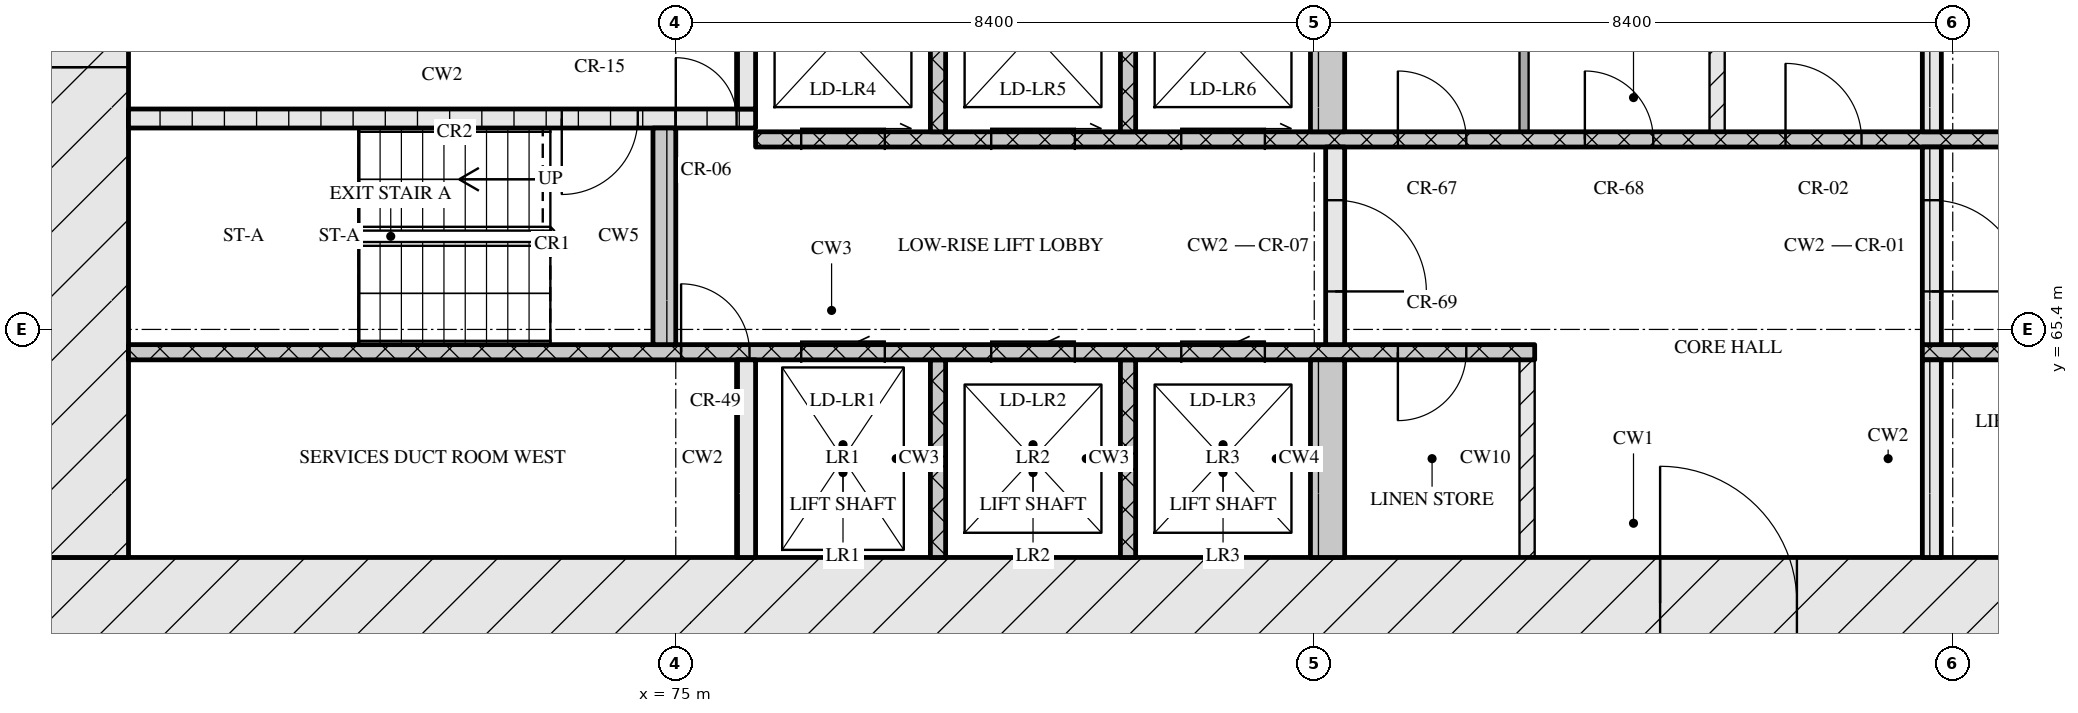
"""IFC4 building model, lengths in metres.
Left out: names, types, materials, properties, quantities, classifications, styles, units other than length and angle.
Written with IfcOpenShell. Run it as: python <this file> out.ifc"""

import sys

from ifc_helpers import new_model, si_unit, direction, frame, frame_2d, origin, place, context, subcontext, project, spatial, rectangle, extrude, element, fill, save


model = new_model("IFC4")
c1 = context("Model", 3, precision=1e-05, world=origin(), true_north=direction((0.0, 1.0)))
c2 = subcontext(c1, "Body", "Model", "MODEL_VIEW")
j1 = project(units=[si_unit("LENGTHUNIT", "METRE"), si_unit("PLANEANGLEUNIT", "RADIAN")], contexts=[c1])
p1 = place(None, origin())
s1 = spatial("IfcSite", under=j1, at=p1, CompositionType="ELEMENT")
p2 = place(p1, origin())
s2 = spatial("IfcBuilding", under=s1, at=p2, CompositionType="ELEMENT")
p3 = place(p2, frame((0.0, 0.0, 69.6)))
s3 = spatial("IfcBuildingStorey", under=s2, at=p3, CompositionType="ELEMENT", Elevation=69.6)
p4 = place(p3, frame((66.6, 61.8, 0.0), z_axis=(0.0, 0.0, 1.0), x_axis=(1.0, 0.0, 0.0)))
e1 = element("IfcWall", 1, at=p4, inside=s3, PredefinedType="SOLIDWALL", context=c2, shape_type="SweptSolid", body=[
    extrude(rectangle(XDim=42.0, YDim=1.2, at=frame_2d((21.0, 0.0))), origin(), (0.0, 0.0, 1.0), 3.32),
])
p5 = place(p4, frame((21.35, 0.0, 0.0)))
e2 = element("IfcOpeningElement", 2, at=p5, cuts=e1, PredefinedType="OPENING", context=c2, shape_type="SweptSolid", body=[
    extrude(rectangle(XDim=1.8, YDim=2.1, at=frame_2d((0.9, 1.05))), frame((0.0, 0.61, 0.0), z_axis=(0.0, -1.0, 0.0), x_axis=(1.0, 0.0, 0.0)), (0.0, 0.0, 1.0), 1.22),
])
p6 = place(p3, frame((67.2, 62.4, 0.0), z_axis=(0.0, 0.0, 1.0), x_axis=(0.0, 1.0, 0.0)))
e3 = element("IfcWall", 3, at=p6, inside=s3, PredefinedType="SOLIDWALL", context=c2, shape_type="SweptSolid", body=[
    extrude(rectangle(XDim=12.0, YDim=1.2, at=frame_2d((6.0, 0.0))), origin(), (0.0, 0.0, 1.0), 3.32),
])
p7 = place(p6, frame((6.45, 0.0, 0.0)))
e4 = element("IfcOpeningElement", 4, at=p7, cuts=e3, PredefinedType="OPENING", context=c2, shape_type="SweptSolid", body=[
    extrude(rectangle(XDim=1.2, YDim=2.1, at=frame_2d((0.6, 1.05))), frame((0.0, 0.61, 0.0), z_axis=(0.0, -1.0, 0.0), x_axis=(1.0, 0.0, 0.0)), (0.0, 0.0, 1.0), 1.22),
])
p8 = place(p3, frame((75.925, 62.4, 0.0), z_axis=(0.0, 0.0, 1.0), x_axis=(0.0, 1.0, 0.0)))
e5 = element("IfcWall", 5, at=p8, inside=s3, PredefinedType="SOLIDWALL", context=c2, shape_type="SweptSolid", body=[
    extrude(rectangle(XDim=2.6, YDim=0.25, at=frame_2d((1.3, 0.0))), origin(), (0.0, 0.0, 1.0), 3.32),
])
for number, where, z_axis, x_axis in (
    (6, (78.45, 62.4, 0.0), (0.0, 0.0, 1.0), (0.0, 1.0, 0.0)),
    (7, (80.95, 62.4, 0.0), (0.0, 0.0, 1.0), (0.0, 1.0, 0.0)),
):
    element("IfcWall", number, at=place(p3, frame(where, z_axis=z_axis, x_axis=x_axis)), inside=s3, PredefinedType="SOLIDWALL", context=c2, shape_type="SweptSolid", body=[
        extrude(rectangle(XDim=2.6, YDim=0.2, at=frame_2d((1.3, 0.0))), origin(), (0.0, 0.0, 1.0), 3.32),
    ])
p9 = place(p3, frame((83.575, 62.4, 0.0), z_axis=(0.0, 0.0, 1.0), x_axis=(0.0, 1.0, 0.0)))
e8 = element("IfcWall", 8, at=p9, inside=s3, PredefinedType="SOLIDWALL", context=c2, shape_type="SweptSolid", body=[
    extrude(rectangle(XDim=2.6, YDim=0.45, at=frame_2d((1.3, 0.0))), origin(), (0.0, 0.0, 1.0), 3.32),
])
p10 = place(p3, frame((86.2, 62.4, 0.0), z_axis=(0.0, 0.0, 1.0), x_axis=(0.0, 1.0, 0.0)))
e9 = element("IfcWall", 9, at=p10, inside=s3, PredefinedType="PARTITIONING", context=c2, shape_type="SweptSolid", body=[
    extrude(rectangle(XDim=2.6, YDim=0.2, at=frame_2d((1.3, 0.0))), origin(), (0.0, 0.0, 1.0), 3.32),
])
p11 = place(p3, frame((91.525, 62.4, 0.0), z_axis=(0.0, 0.0, 1.0), x_axis=(0.0, 1.0, 0.0)))
e10 = element("IfcWall", 10, at=p11, inside=s3, PredefinedType="SOLIDWALL", context=c2, shape_type="SweptSolid", body=[
    extrude(rectangle(XDim=2.6, YDim=0.25, at=frame_2d((1.3, 0.0))), origin(), (0.0, 0.0, 1.0), 3.32),
])
p12 = place(p3, frame((67.8, 65.1, 0.0), z_axis=(0.0, 0.0, 1.0), x_axis=(1.0, 0.0, 0.0)))
e11 = element("IfcWall", 11, at=p12, inside=s3, PredefinedType="SOLIDWALL", context=c2, shape_type="SweptSolid", body=[
    extrude(rectangle(XDim=18.5, YDim=0.2, at=frame_2d((9.25, 0.0))), origin(), (0.0, 0.0, 1.0), 3.32),
])
p13 = place(p12, frame((7.27, 0.0, 0.0)))
e12 = element("IfcOpeningElement", 12, at=p13, cuts=e11, PredefinedType="OPENING", context=c2, shape_type="SweptSolid", body=[
    extrude(rectangle(XDim=0.9, YDim=2.1, at=frame_2d((0.45, 1.05))), frame((0.0, 0.11, 0.0), z_axis=(0.0, -1.0, 0.0), x_axis=(1.0, 0.0, 0.0)), (0.0, 0.0, 1.0), 0.22),
])
p14 = place(p12, frame((8.85, 0.0, 0.0)))
e13 = element("IfcOpeningElement", 13, at=p14, cuts=e11, PredefinedType="OPENING", context=c2, shape_type="SweptSolid", body=[
    extrude(rectangle(XDim=1.1, YDim=2.1, at=frame_2d((0.55, 1.05))), frame((0.0, 0.11, 0.0), z_axis=(0.0, -1.0, 0.0), x_axis=(1.0, 0.0, 0.0)), (0.0, 0.0, 1.0), 0.22),
])
p15 = place(p12, frame((11.35, 0.0, 0.0)))
e14 = element("IfcOpeningElement", 14, at=p15, cuts=e11, PredefinedType="OPENING", context=c2, shape_type="SweptSolid", body=[
    extrude(rectangle(XDim=1.1, YDim=2.1, at=frame_2d((0.55, 1.05))), frame((0.0, 0.11, 0.0), z_axis=(0.0, -1.0, 0.0), x_axis=(1.0, 0.0, 0.0)), (0.0, 0.0, 1.0), 0.22),
])
p16 = place(p12, frame((13.85, 0.0, 0.0)))
e15 = element("IfcOpeningElement", 15, at=p16, cuts=e11, PredefinedType="OPENING", context=c2, shape_type="SweptSolid", body=[
    extrude(rectangle(XDim=1.1, YDim=2.1, at=frame_2d((0.55, 1.05))), frame((0.0, 0.11, 0.0), z_axis=(0.0, -1.0, 0.0), x_axis=(1.0, 0.0, 0.0)), (0.0, 0.0, 1.0), 0.22),
])
p17 = place(p12, frame((16.7, 0.0, 0.0)))
e16 = element("IfcOpeningElement", 16, at=p17, cuts=e11, PredefinedType="OPENING", context=c2, shape_type="SweptSolid", body=[
    extrude(rectangle(XDim=0.9, YDim=2.1, at=frame_2d((0.45, 1.05))), frame((0.0, 0.11, 0.0), z_axis=(0.0, -1.0, 0.0), x_axis=(1.0, 0.0, 0.0)), (0.0, 0.0, 1.0), 0.22),
])
p18 = place(p3, frame((91.4, 65.1, 0.0), z_axis=(0.0, 0.0, 1.0), x_axis=(1.0, 0.0, 0.0)))
e17 = element("IfcWall", 17, at=p18, inside=s3, PredefinedType="SOLIDWALL", context=c2, shape_type="SweptSolid", body=[
    extrude(rectangle(XDim=16.0, YDim=0.2, at=frame_2d((8.0, 0.0))), origin(), (0.0, 0.0, 1.0), 3.32),
])
p19 = place(p18, frame((7.83, 0.0, 0.0)))
e18 = element("IfcOpeningElement", 18, at=p19, cuts=e17, PredefinedType="OPENING", context=c2, shape_type="SweptSolid", body=[
    extrude(rectangle(XDim=0.9, YDim=2.1, at=frame_2d((0.45, 1.05))), frame((0.0, 0.11, 0.0), z_axis=(0.0, -1.0, 0.0), x_axis=(1.0, 0.0, 0.0)), (0.0, 0.0, 1.0), 0.22),
])
p20 = place(p3, frame((74.85, 65.2, 0.0), z_axis=(0.0, 0.0, 1.0), x_axis=(0.0, 1.0, 0.0)))
e19 = element("IfcWall", 19, at=p20, inside=s3, PredefinedType="SOLIDWALL", context=c2, shape_type="SweptSolid", body=[
    extrude(rectangle(XDim=2.85, YDim=0.3, at=frame_2d((1.425, 0.0))), origin(), (0.0, 0.0, 1.0), 3.32),
])
p21 = place(p3, frame((83.675, 65.2, 0.0), z_axis=(0.0, 0.0, 1.0), x_axis=(0.0, 1.0, 0.0)))
e20 = element("IfcWall", 20, at=p21, inside=s3, PredefinedType="SOLIDWALL", context=c2, shape_type="SweptSolid", body=[
    extrude(rectangle(XDim=2.6, YDim=0.25, at=frame_2d((1.3, 0.0))), origin(), (0.0, 0.0, 1.0), 3.32),
])
p22 = place(p21, frame((0.7, 0.0, 0.0)))
e21 = element("IfcOpeningElement", 21, at=p22, cuts=e20, PredefinedType="OPENING", context=c2, shape_type="SweptSolid", body=[
    extrude(rectangle(XDim=1.2, YDim=2.1, at=frame_2d((0.6, 1.05))), frame((0.0, 0.135, 0.0), z_axis=(0.0, -1.0, 0.0), x_axis=(1.0, 0.0, 0.0)), (0.0, 0.0, 1.0), 0.27),
])
p23 = place(p3, frame((91.525, 65.2, 0.0), z_axis=(0.0, 0.0, 1.0), x_axis=(0.0, 1.0, 0.0)))
e22 = element("IfcWall", 22, at=p23, inside=s3, PredefinedType="SOLIDWALL", context=c2, shape_type="SweptSolid", body=[
    extrude(rectangle(XDim=2.6, YDim=0.25, at=frame_2d((1.3, 0.0))), origin(), (0.0, 0.0, 1.0), 3.32),
])
p24 = place(p23, frame((0.7, 0.0, 0.0)))
e23 = element("IfcOpeningElement", 23, at=p24, cuts=e22, PredefinedType="OPENING", context=c2, shape_type="SweptSolid", body=[
    extrude(rectangle(XDim=1.2, YDim=2.1, at=frame_2d((0.6, 1.05))), frame((0.0, 0.135, 0.0), z_axis=(0.0, -1.0, 0.0), x_axis=(1.0, 0.0, 0.0)), (0.0, 0.0, 1.0), 0.27),
])
p25 = place(p3, frame((76.05, 67.9, 0.0), z_axis=(0.0, 0.0, 1.0), x_axis=(1.0, 0.0, 0.0)))
e24 = element("IfcWall", 24, at=p25, inside=s3, PredefinedType="SOLIDWALL", context=c2, shape_type="SweptSolid", body=[
    extrude(rectangle(XDim=23.1, YDim=0.2, at=frame_2d((11.55, 0.0))), origin(), (0.0, 0.0, 1.0), 3.32),
])
p26 = place(p25, frame((0.6, 0.0, 0.0)))
e25 = element("IfcOpeningElement", 25, at=p26, cuts=e24, PredefinedType="OPENING", context=c2, shape_type="SweptSolid", body=[
    extrude(rectangle(XDim=1.1, YDim=2.1, at=frame_2d((0.55, 1.05))), frame((0.0, 0.11, 0.0), z_axis=(0.0, -1.0, 0.0), x_axis=(1.0, 0.0, 0.0)), (0.0, 0.0, 1.0), 0.22),
])
p27 = place(p25, frame((3.1, 0.0, 0.0)))
e26 = element("IfcOpeningElement", 26, at=p27, cuts=e24, PredefinedType="OPENING", context=c2, shape_type="SweptSolid", body=[
    extrude(rectangle(XDim=1.1, YDim=2.1, at=frame_2d((0.55, 1.05))), frame((0.0, 0.11, 0.0), z_axis=(0.0, -1.0, 0.0), x_axis=(1.0, 0.0, 0.0)), (0.0, 0.0, 1.0), 0.22),
])
p28 = place(p25, frame((5.6, 0.0, 0.0)))
e27 = element("IfcOpeningElement", 27, at=p28, cuts=e24, PredefinedType="OPENING", context=c2, shape_type="SweptSolid", body=[
    extrude(rectangle(XDim=1.1, YDim=2.1, at=frame_2d((0.55, 1.05))), frame((0.0, 0.11, 0.0), z_axis=(0.0, -1.0, 0.0), x_axis=(1.0, 0.0, 0.0)), (0.0, 0.0, 1.0), 0.22),
])
p29 = place(p25, frame((8.45, 0.0, 0.0)))
e28 = element("IfcOpeningElement", 28, at=p29, cuts=e24, PredefinedType="OPENING", context=c2, shape_type="SweptSolid", body=[
    extrude(rectangle(XDim=0.9, YDim=2.1, at=frame_2d((0.45, 1.05))), frame((0.0, 0.11, 0.0), z_axis=(0.0, -1.0, 0.0), x_axis=(1.0, 0.0, 0.0)), (0.0, 0.0, 1.0), 0.22),
])
p30 = place(p25, frame((10.91, 0.0, 0.0)))
e29 = element("IfcOpeningElement", 29, at=p30, cuts=e24, PredefinedType="OPENING", context=c2, shape_type="SweptSolid", body=[
    extrude(rectangle(XDim=0.9, YDim=2.1, at=frame_2d((0.45, 1.05))), frame((0.0, 0.11, 0.0), z_axis=(0.0, -1.0, 0.0), x_axis=(1.0, 0.0, 0.0)), (0.0, 0.0, 1.0), 0.22),
])
p31 = place(p25, frame((13.55, 0.0, 0.0)))
e30 = element("IfcOpeningElement", 30, at=p31, cuts=e24, PredefinedType="OPENING", context=c2, shape_type="SweptSolid", body=[
    extrude(rectangle(XDim=1.0, YDim=2.1, at=frame_2d((0.5, 1.05))), frame((0.0, 0.11, 0.0), z_axis=(0.0, -1.0, 0.0), x_axis=(1.0, 0.0, 0.0)), (0.0, 0.0, 1.0), 0.22),
])
for number, where, z_axis, x_axis in (
    (31, (78.45, 68.0, 0.0), (0.0, 0.0, 1.0), (0.0, 1.0, 0.0)),
    (32, (80.95, 68.0, 0.0), (0.0, 0.0, 1.0), (0.0, 1.0, 0.0)),
):
    element("IfcWall", number, at=place(p3, frame(where, z_axis=z_axis, x_axis=x_axis)), inside=s3, PredefinedType="SOLIDWALL", context=c2, shape_type="SweptSolid", body=[
        extrude(rectangle(XDim=2.6, YDim=0.2, at=frame_2d((1.3, 0.0))), origin(), (0.0, 0.0, 1.0), 3.32),
    ])
p32 = place(p3, frame((83.575, 68.0, 0.0), z_axis=(0.0, 0.0, 1.0), x_axis=(0.0, 1.0, 0.0)))
e33 = element("IfcWall", 33, at=p32, inside=s3, PredefinedType="SOLIDWALL", context=c2, shape_type="SweptSolid", body=[
    extrude(rectangle(XDim=2.6, YDim=0.45, at=frame_2d((1.3, 0.0))), origin(), (0.0, 0.0, 1.0), 3.32),
])
p33 = place(p3, frame((86.16, 68.0, 0.0), z_axis=(0.0, 0.0, 1.0), x_axis=(0.0, 1.0, 0.0)))
e34 = element("IfcWall", 34, at=p33, inside=s3, PredefinedType="PARTITIONING", context=c2, shape_type="SweptSolid", body=[
    extrude(rectangle(XDim=2.6, YDim=0.12, at=frame_2d((1.3, 0.0))), origin(), (0.0, 0.0, 1.0), 3.32),
])
p34 = place(p3, frame((88.7, 68.0, 0.0), z_axis=(0.0, 0.0, 1.0), x_axis=(0.0, 1.0, 0.0)))
e35 = element("IfcWall", 35, at=p34, inside=s3, PredefinedType="PARTITIONING", context=c2, shape_type="SweptSolid", body=[
    extrude(rectangle(XDim=2.6, YDim=0.2, at=frame_2d((1.3, 0.0))), origin(), (0.0, 0.0, 1.0), 3.32),
])
p35 = place(p3, frame((91.525, 68.0, 0.0), z_axis=(0.0, 0.0, 1.0), x_axis=(0.0, 1.0, 0.0)))
e36 = element("IfcWall", 36, at=p35, inside=s3, PredefinedType="SOLIDWALL", context=c2, shape_type="SweptSolid", body=[
    extrude(rectangle(XDim=2.6, YDim=0.25, at=frame_2d((1.3, 0.0))), origin(), (0.0, 0.0, 1.0), 3.32),
])
p36 = place(p3, frame((67.8, 68.175, 0.0), z_axis=(0.0, 0.0, 1.0), x_axis=(1.0, 0.0, 0.0)))
e37 = element("IfcWall", 37, at=p36, inside=s3, PredefinedType="SOLIDWALL", context=c2, shape_type="SweptSolid", body=[
    extrude(rectangle(XDim=8.25, YDim=0.25, at=frame_2d((4.125, 0.0))), origin(), (0.0, 0.0, 1.0), 3.32),
])
p37 = place(p36, frame((5.7, 0.0, 0.0)))
e38 = element("IfcOpeningElement", 38, at=p37, cuts=e37, PredefinedType="OPENING", context=c2, shape_type="SweptSolid", body=[
    extrude(rectangle(XDim=1.0, YDim=2.1, at=frame_2d((0.5, 1.05))), frame((0.0, 0.135, 0.0), z_axis=(0.0, -1.0, 0.0), x_axis=(1.0, 0.0, 0.0)), (0.0, 0.0, 1.0), 0.27),
])
p38 = place(p36, frame((7.2, 0.0, 0.0)))
e39 = element("IfcOpeningElement", 39, at=p38, cuts=e37, PredefinedType="OPENING", context=c2, shape_type="SweptSolid", body=[
    extrude(rectangle(XDim=0.8, YDim=2.1, at=frame_2d((0.4, 1.05))), frame((0.0, 0.135, 0.0), z_axis=(0.0, -1.0, 0.0), x_axis=(1.0, 0.0, 0.0)), (0.0, 0.0, 1.0), 0.27),
])
p39 = place(p3, frame((75.925, 68.3, 0.0), z_axis=(0.0, 0.0, 1.0), x_axis=(0.0, 1.0, 0.0)))
e40 = element("IfcWall", 40, at=p39, inside=s3, PredefinedType="SOLIDWALL", context=c2, shape_type="SweptSolid", body=[
    extrude(rectangle(XDim=2.3, YDim=0.25, at=frame_2d((1.15, 0.0))), origin(), (0.0, 0.0, 1.0), 3.32),
])
p40 = place(p5, origin())
e41 = element("IfcDoor", 41, at=p40, inside=s3, OperationType="DOUBLE_DOOR_SINGLE_SWING", PredefinedType="DOOR", context=c2, shape_type="SweptSolid", body=[
    extrude(rectangle(XDim=1.8, YDim=2.1, at=frame_2d((0.9, 1.05))), frame((0.0, 0.025, 0.0), z_axis=(0.0, -1.0, 0.0), x_axis=(1.0, 0.0, 0.0)), (0.0, 0.0, 1.0), 0.05),
])
fill(e2, e41)
p41 = place(p13, origin())
e42 = element("IfcDoor", 42, at=p41, inside=s3, OperationType="SINGLE_SWING_LEFT", PredefinedType="DOOR", context=c2, shape_type="SweptSolid", body=[
    extrude(rectangle(XDim=0.9, YDim=2.1, at=frame_2d((0.45, 1.05))), frame((0.0, 0.025, 0.0), z_axis=(0.0, -1.0, 0.0), x_axis=(1.0, 0.0, 0.0)), (0.0, 0.0, 1.0), 0.05),
])
fill(e12, e42)
p42 = place(p14, origin())
e43 = element("IfcDoor", 43, at=p42, inside=s3, OperationType="SLIDING_TO_LEFT", PredefinedType="DOOR", context=c2, shape_type="SweptSolid", body=[
    extrude(rectangle(XDim=1.1, YDim=2.1, at=frame_2d((0.55, 1.05))), frame((0.0, 0.025, 0.0), z_axis=(0.0, -1.0, 0.0), x_axis=(1.0, 0.0, 0.0)), (0.0, 0.0, 1.0), 0.05),
])
fill(e13, e43)
p43 = place(p15, origin())
e44 = element("IfcDoor", 44, at=p43, inside=s3, OperationType="SLIDING_TO_LEFT", PredefinedType="DOOR", context=c2, shape_type="SweptSolid", body=[
    extrude(rectangle(XDim=1.1, YDim=2.1, at=frame_2d((0.55, 1.05))), frame((0.0, 0.025, 0.0), z_axis=(0.0, -1.0, 0.0), x_axis=(1.0, 0.0, 0.0)), (0.0, 0.0, 1.0), 0.05),
])
fill(e14, e44)
p44 = place(p16, origin())
e45 = element("IfcDoor", 45, at=p44, inside=s3, OperationType="SLIDING_TO_LEFT", PredefinedType="DOOR", context=c2, shape_type="SweptSolid", body=[
    extrude(rectangle(XDim=1.1, YDim=2.1, at=frame_2d((0.55, 1.05))), frame((0.0, 0.025, 0.0), z_axis=(0.0, -1.0, 0.0), x_axis=(1.0, 0.0, 0.0)), (0.0, 0.0, 1.0), 0.05),
])
fill(e15, e45)
p45 = place(p17, origin())
e46 = element("IfcDoor", 46, at=p45, inside=s3, OperationType="SINGLE_SWING_RIGHT", PredefinedType="DOOR", context=c2, shape_type="SweptSolid", body=[
    extrude(rectangle(XDim=0.9, YDim=2.1, at=frame_2d((0.45, 1.05))), frame((0.0, 0.025, 0.0), z_axis=(0.0, -1.0, 0.0), x_axis=(1.0, 0.0, 0.0)), (0.0, 0.0, 1.0), 0.05),
])
fill(e16, e46)
p46 = place(p22, origin())
e47 = element("IfcDoor", 47, at=p46, inside=s3, OperationType="SINGLE_SWING_RIGHT", PredefinedType="DOOR", context=c2, shape_type="SweptSolid", body=[
    extrude(rectangle(XDim=1.2, YDim=2.1, at=frame_2d((0.6, 1.05))), frame((0.0, 0.025, 0.0), z_axis=(0.0, -1.0, 0.0), x_axis=(1.0, 0.0, 0.0)), (0.0, 0.0, 1.0), 0.05),
])
fill(e21, e47)
p47 = place(p24, origin())
e48 = element("IfcDoor", 48, at=p47, inside=s3, OperationType="SINGLE_SWING_RIGHT", PredefinedType="DOOR", context=c2, shape_type="SweptSolid", body=[
    extrude(rectangle(XDim=1.2, YDim=2.1, at=frame_2d((0.6, 1.05))), frame((0.0, 0.025, 0.0), z_axis=(0.0, -1.0, 0.0), x_axis=(1.0, 0.0, 0.0)), (0.0, 0.0, 1.0), 0.05),
])
fill(e23, e48)
p48 = place(p26, origin())
e49 = element("IfcDoor", 49, at=p48, inside=s3, OperationType="SLIDING_TO_RIGHT", PredefinedType="DOOR", context=c2, shape_type="SweptSolid", body=[
    extrude(rectangle(XDim=1.1, YDim=2.1, at=frame_2d((0.55, 1.05))), frame((0.0, 0.025, 0.0), z_axis=(0.0, -1.0, 0.0), x_axis=(1.0, 0.0, 0.0)), (0.0, 0.0, 1.0), 0.05),
])
fill(e25, e49)
p49 = place(p27, origin())
e50 = element("IfcDoor", 50, at=p49, inside=s3, OperationType="SLIDING_TO_RIGHT", PredefinedType="DOOR", context=c2, shape_type="SweptSolid", body=[
    extrude(rectangle(XDim=1.1, YDim=2.1, at=frame_2d((0.55, 1.05))), frame((0.0, 0.025, 0.0), z_axis=(0.0, -1.0, 0.0), x_axis=(1.0, 0.0, 0.0)), (0.0, 0.0, 1.0), 0.05),
])
fill(e26, e50)
p50 = place(p28, origin())
e51 = element("IfcDoor", 51, at=p50, inside=s3, OperationType="SLIDING_TO_RIGHT", PredefinedType="DOOR", context=c2, shape_type="SweptSolid", body=[
    extrude(rectangle(XDim=1.1, YDim=2.1, at=frame_2d((0.55, 1.05))), frame((0.0, 0.025, 0.0), z_axis=(0.0, -1.0, 0.0), x_axis=(1.0, 0.0, 0.0)), (0.0, 0.0, 1.0), 0.05),
])
fill(e27, e51)
p51 = place(p29, origin())
e52 = element("IfcDoor", 52, at=p51, inside=s3, OperationType="SINGLE_SWING_LEFT", PredefinedType="DOOR", context=c2, shape_type="SweptSolid", body=[
    extrude(rectangle(XDim=0.9, YDim=2.1, at=frame_2d((0.45, 1.05))), frame((0.0, 0.025, 0.0), z_axis=(0.0, -1.0, 0.0), x_axis=(1.0, 0.0, 0.0)), (0.0, 0.0, 1.0), 0.05),
])
fill(e28, e52)
p52 = place(p30, origin())
e53 = element("IfcDoor", 53, at=p52, inside=s3, OperationType="SINGLE_SWING_LEFT", PredefinedType="DOOR", context=c2, shape_type="SweptSolid", body=[
    extrude(rectangle(XDim=0.9, YDim=2.1, at=frame_2d((0.45, 1.05))), frame((0.0, 0.025, 0.0), z_axis=(0.0, -1.0, 0.0), x_axis=(1.0, 0.0, 0.0)), (0.0, 0.0, 1.0), 0.05),
])
fill(e29, e53)
p53 = place(p31, origin())
e54 = element("IfcDoor", 54, at=p53, inside=s3, OperationType="SINGLE_SWING_LEFT", PredefinedType="DOOR", context=c2, shape_type="SweptSolid", body=[
    extrude(rectangle(XDim=1.0, YDim=2.1, at=frame_2d((0.5, 1.05))), frame((0.0, 0.025, 0.0), z_axis=(0.0, -1.0, 0.0), x_axis=(1.0, 0.0, 0.0)), (0.0, 0.0, 1.0), 0.05),
])
fill(e30, e54)
p54 = place(p37, origin())
e55 = element("IfcDoor", 55, at=p54, inside=s3, OperationType="SINGLE_SWING_RIGHT", PredefinedType="DOOR", context=c2, shape_type="SweptSolid", body=[
    extrude(rectangle(XDim=1.0, YDim=2.1, at=frame_2d((0.5, 1.05))), frame((0.0, 0.025, 0.0), z_axis=(0.0, -1.0, 0.0), x_axis=(1.0, 0.0, 0.0)), (0.0, 0.0, 1.0), 0.05),
])
fill(e38, e55)
p55 = place(p38, origin())
e56 = element("IfcDoor", 56, at=p55, inside=s3, OperationType="SINGLE_SWING_LEFT", PredefinedType="DOOR", context=c2, shape_type="SweptSolid", body=[
    extrude(rectangle(XDim=0.8, YDim=2.1, at=frame_2d((0.4, 1.05))), frame((0.0, 0.025, 0.0), z_axis=(0.0, -1.0, 0.0), x_axis=(1.0, 0.0, 0.0)), (0.0, 0.0, 1.0), 0.05),
])
fill(e39, e56)
p56 = place(p7, origin())
e57 = element("IfcDoor", 57, at=p56, inside=s3, OperationType="SINGLE_SWING_LEFT", PredefinedType="DOOR", context=c2, shape_type="SweptSolid", body=[
    extrude(rectangle(XDim=1.2, YDim=2.1, at=frame_2d((0.6, 1.05))), frame((0.0, 0.025, 0.0), z_axis=(0.0, -1.0, 0.0), x_axis=(1.0, 0.0, 0.0)), (0.0, 0.0, 1.0), 0.05),
])
fill(e4, e57)
save(model, sys.argv[1])
